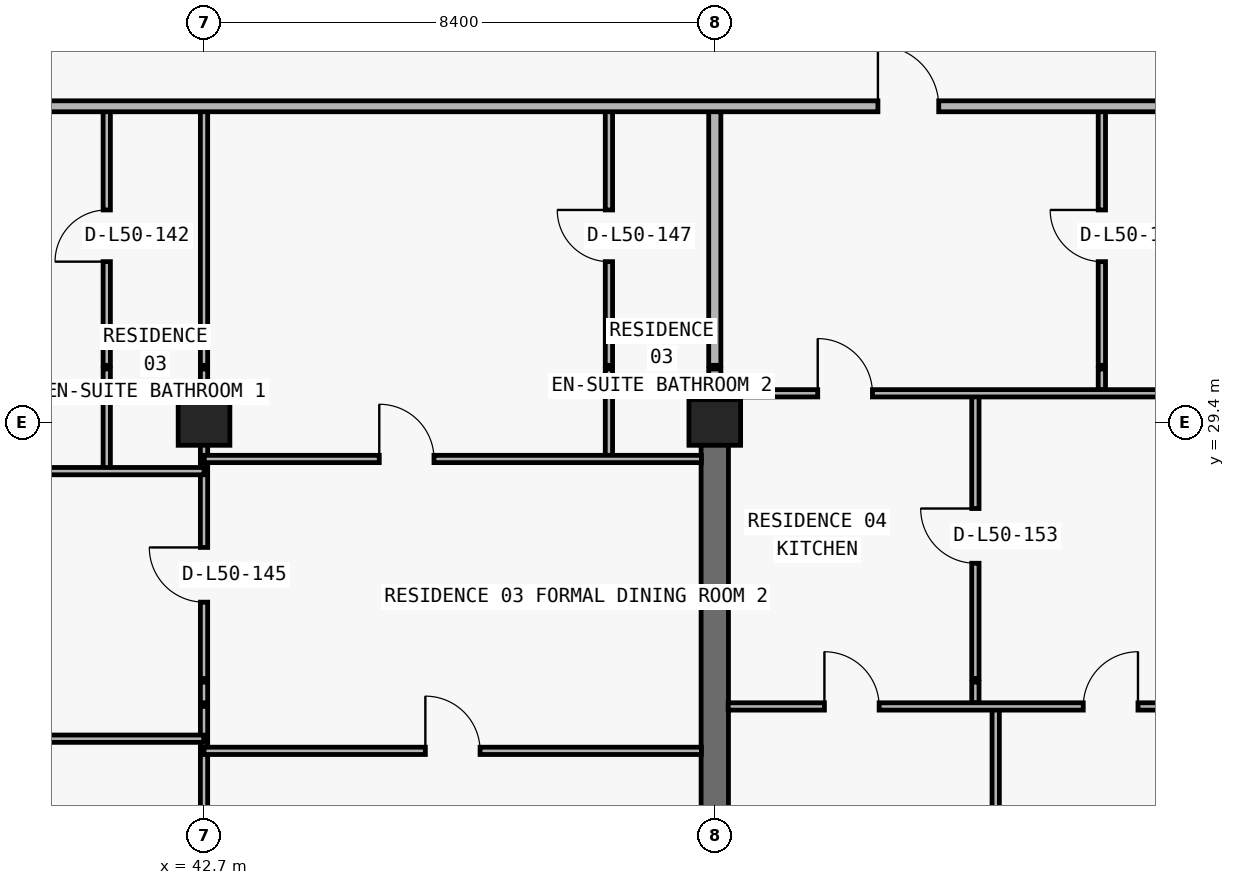
"""IFC4 building model, lengths in metres.
Left out: names, types, materials, properties, quantities, classifications, styles, units other than length and angle.
Written with IfcOpenShell. Run it as: python <this file> out.ifc"""

import sys

from ifc_helpers import new_model, si_unit, direction, frame, frame_2d, origin, origin_2d, place, context, subcontext, project, spatial, rectangle, extrude, element, fill, save


model = new_model("IFC4")
c1 = context("Model", 3, precision=1e-05, world=origin(), true_north=direction((0.0, 1.0)))
c2 = subcontext(c1, "Body", "Model", "MODEL_VIEW")
j1 = project(units=[si_unit("LENGTHUNIT", "METRE"), si_unit("PLANEANGLEUNIT", "RADIAN")], contexts=[c1])
p1 = place(None, origin())
s1 = spatial("IfcSite", under=j1, at=p1, CompositionType="ELEMENT")
p2 = place(p1, origin())
s2 = spatial("IfcBuilding", under=s1, at=p2, CompositionType="ELEMENT")
p3 = place(p2, frame((0.0, 0.0, 180.3)))
s3 = spatial("IfcBuildingStorey", under=s2, at=p3, CompositionType="ELEMENT", Elevation=180.3)
for number, where, z_axis, x_axis in (
    (1, (42.7, 29.4, 0.0), (0.0, 0.0, 1.0), (1.0, 0.0, 0.0)),
    (2, (51.1, 29.4, 0.0), (0.0, 0.0, 1.0), (1.0, 0.0, 0.0)),
):
    element("IfcColumn", number, at=place(p3, frame(where, z_axis=z_axis, x_axis=x_axis)), inside=s3, PredefinedType="COLUMN", context=c2, shape_type="SweptSolid", body=[
        extrude(rectangle(XDim=0.85, YDim=0.75, at=origin_2d()), origin(), (0.0, 0.0, 1.0), 3.0),
    ])
p4 = place(p3, frame((51.1, 20.8, 0.0), z_axis=(0.0, 0.0, 1.0), x_axis=(0.0, 1.0, 0.0)))
e3 = element("IfcWall", 3, at=p4, inside=s3, PredefinedType="SHEAR", context=c2, shape_type="SweptSolid", body=[
    extrude(rectangle(XDim=8.6, YDim=0.45, at=frame_2d((4.3, 0.0))), origin(), (0.0, 0.0, 1.0), 3.0),
])
p5 = place(p3, frame((41.1, 28.6, 0.0), z_axis=(0.0, 0.0, 1.0), x_axis=(0.0, 1.0, 0.0)))
e4 = element("IfcWall", 4, at=p5, inside=s3, PredefinedType="PARTITIONING", context=c2, shape_type="SweptSolid", body=[
    extrude(rectangle(XDim=1.28, YDim=0.12, at=frame_2d((0.64, 0.0))), origin(), (0.0, 0.0, 1.0), 3.0),
])
p6 = place(p3, frame((41.1, 29.94, 0.0), z_axis=(0.0, 0.0, 1.0), x_axis=(0.0, 1.0, 0.0)))
e5 = element("IfcWall", 5, at=p6, inside=s3, PredefinedType="PARTITIONING", context=c2, shape_type="SweptSolid", body=[
    extrude(rectangle(XDim=0.34, YDim=0.12, at=frame_2d((0.17, 0.0))), origin(), (0.0, 0.0, 1.0), 3.0),
])
p7 = place(p3, frame((41.1, 30.34, 0.0), z_axis=(0.0, 0.0, 1.0), x_axis=(0.0, 1.0, 0.0)))
e6 = element("IfcWall", 6, at=p7, inside=s3, PredefinedType="PARTITIONING", context=c2, shape_type="SweptSolid", body=[
    extrude(rectangle(XDim=4.26, YDim=0.12, at=frame_2d((2.13, 0.0))), origin(), (0.0, 0.0, 1.0), 3.0),
])
p8 = place(p7, frame((1.705, 0.0, 0.0)))
e7 = element("IfcOpeningElement", 7, at=p8, cuts=e6, PredefinedType="OPENING", context=c2, shape_type="SweptSolid", body=[
    extrude(rectangle(XDim=0.85, YDim=2.1, at=frame_2d((0.425, 1.05))), frame((0.0, 0.07, 0.0), z_axis=(0.0, -1.0, 0.0), x_axis=(1.0, 0.0, 0.0)), (0.0, 0.0, 1.0), 0.14),
])
p9 = place(p3, frame((42.7, 11.24, 0.0), z_axis=(0.0, 0.0, 1.0), x_axis=(0.0, 1.0, 0.0)))
e8 = element("IfcWall", 8, at=p9, inside=s3, PredefinedType="PARTITIONING", context=c2, shape_type="SweptSolid", body=[
    extrude(rectangle(XDim=13.49, YDim=0.12, at=frame_2d((6.745, 0.0))), origin(), (0.0, 0.0, 1.0), 2.213),
])
p10 = place(p3, frame((42.7, 24.79, 0.0), z_axis=(0.0, 0.0, 1.0), x_axis=(0.0, 1.0, 0.0)))
e9 = element("IfcWall", 9, at=p10, inside=s3, PredefinedType="PARTITIONING", context=c2, shape_type="SweptSolid", body=[
    extrude(rectangle(XDim=0.34, YDim=0.12, at=frame_2d((0.17, 0.0))), origin(), (0.0, 0.0, 1.0), 2.213),
])
p11 = place(p3, frame((42.7, 25.19, 0.0), z_axis=(0.0, 0.0, 1.0), x_axis=(0.0, 1.0, 0.0)))
e10 = element("IfcWall", 10, at=p11, inside=s3, PredefinedType="PARTITIONING", context=c2, shape_type="SweptSolid", body=[
    extrude(rectangle(XDim=4.69, YDim=0.12, at=frame_2d((2.345, 0.0))), origin(), (0.0, 0.0, 1.0), 2.213),
])
p12 = place(p11, frame((1.255, 0.0, 0.0)))
e11 = element("IfcOpeningElement", 11, at=p12, cuts=e10, PredefinedType="OPENING", context=c2, shape_type="SweptSolid", body=[
    extrude(rectangle(XDim=0.9, YDim=2.15, at=frame_2d((0.45, 1.075))), frame((0.0, 0.07, 0.0), z_axis=(0.0, -1.0, 0.0), x_axis=(1.0, 0.0, 0.0)), (0.0, 0.0, 1.0), 0.14),
])
p13 = place(p3, frame((42.7, 29.94, 0.0), z_axis=(0.0, 0.0, 1.0), x_axis=(0.0, 1.0, 0.0)))
e12 = element("IfcWall", 12, at=p13, inside=s3, PredefinedType="PARTITIONING", context=c2, shape_type="SweptSolid", body=[
    extrude(rectangle(XDim=0.34, YDim=0.12, at=frame_2d((0.17, 0.0))), origin(), (0.0, 0.0, 1.0), 2.213),
])
p14 = place(p3, frame((42.7, 30.34, 0.0), z_axis=(0.0, 0.0, 1.0), x_axis=(0.0, 1.0, 0.0)))
e13 = element("IfcWall", 13, at=p14, inside=s3, PredefinedType="PARTITIONING", context=c2, shape_type="SweptSolid", body=[
    extrude(rectangle(XDim=4.26, YDim=0.12, at=frame_2d((2.13, 0.0))), origin(), (0.0, 0.0, 1.0), 2.213),
])
p15 = place(p3, frame((49.359, 28.8, 0.0), z_axis=(0.0, 0.0, 1.0), x_axis=(0.0, 1.0, 0.0)))
e14 = element("IfcWall", 14, at=p15, inside=s3, PredefinedType="PARTITIONING", context=c2, shape_type="SweptSolid", body=[
    extrude(rectangle(XDim=1.08, YDim=0.12, at=frame_2d((0.54, 0.0))), origin(), (0.0, 0.0, 1.0), 3.0),
])
p16 = place(p3, frame((49.359, 29.94, 0.0), z_axis=(0.0, 0.0, 1.0), x_axis=(0.0, 1.0, 0.0)))
e15 = element("IfcWall", 15, at=p16, inside=s3, PredefinedType="PARTITIONING", context=c2, shape_type="SweptSolid", body=[
    extrude(rectangle(XDim=0.34, YDim=0.12, at=frame_2d((0.17, 0.0))), origin(), (0.0, 0.0, 1.0), 3.0),
])
p17 = place(p3, frame((49.359, 30.34, 0.0), z_axis=(0.0, 0.0, 1.0), x_axis=(0.0, 1.0, 0.0)))
e16 = element("IfcWall", 16, at=p17, inside=s3, PredefinedType="PARTITIONING", context=c2, shape_type="SweptSolid", body=[
    extrude(rectangle(XDim=4.26, YDim=0.12, at=frame_2d((2.13, 0.0))), origin(), (0.0, 0.0, 1.0), 3.0),
])
p18 = place(p17, frame((1.705, 0.0, 0.0)))
e17 = element("IfcOpeningElement", 17, at=p18, cuts=e16, PredefinedType="OPENING", context=c2, shape_type="SweptSolid", body=[
    extrude(rectangle(XDim=0.85, YDim=2.1, at=frame_2d((0.425, 1.05))), frame((0.0, 0.07, 0.0), z_axis=(0.0, -1.0, 0.0), x_axis=(1.0, 0.0, 0.0)), (0.0, 0.0, 1.0), 0.14),
])
p19 = place(p3, frame((51.1, 29.405, 0.0), z_axis=(0.0, 0.0, 1.0), x_axis=(0.0, 1.0, 0.0)))
e18 = element("IfcWall", 18, at=p19, inside=s3, PredefinedType="PARTITIONING", context=c2, shape_type="SweptSolid", body=[
    extrude(rectangle(XDim=0.475, YDim=0.2, at=frame_2d((0.237, 0.0))), origin(), (0.0, 0.0, 1.0), 2.285),
])
p20 = place(p3, frame((51.1, 29.94, 0.0), z_axis=(0.0, 0.0, 1.0), x_axis=(0.0, 1.0, 0.0)))
e19 = element("IfcWall", 19, at=p20, inside=s3, PredefinedType="PARTITIONING", context=c2, shape_type="SweptSolid", body=[
    extrude(rectangle(XDim=0.34, YDim=0.2, at=frame_2d((0.17, 0.0))), origin(), (0.0, 0.0, 1.0), 2.285),
])
p21 = place(p3, frame((51.1, 30.34, 0.0), z_axis=(0.0, 0.0, 1.0), x_axis=(0.0, 1.0, 0.0)))
e20 = element("IfcWall", 20, at=p21, inside=s3, PredefinedType="PARTITIONING", context=c2, shape_type="SweptSolid", body=[
    extrude(rectangle(XDim=4.26, YDim=0.2, at=frame_2d((2.13, 0.0))), origin(), (0.0, 0.0, 1.0), 2.285),
])
p22 = place(p3, frame((55.386, 24.79, 0.0), z_axis=(0.0, 0.0, 1.0), x_axis=(0.0, 1.0, 0.0)))
e21 = element("IfcWall", 21, at=p22, inside=s3, PredefinedType="PARTITIONING", context=c2, shape_type="SweptSolid", body=[
    extrude(rectangle(XDim=0.34, YDim=0.12, at=frame_2d((0.17, 0.0))), origin(), (0.0, 0.0, 1.0), 3.0),
])
p23 = place(p3, frame((55.386, 25.19, 0.0), z_axis=(0.0, 0.0, 1.0), x_axis=(0.0, 1.0, 0.0)))
e22 = element("IfcWall", 22, at=p23, inside=s3, PredefinedType="PARTITIONING", context=c2, shape_type="SweptSolid", body=[
    extrude(rectangle(XDim=4.69, YDim=0.12, at=frame_2d((2.345, 0.0))), origin(), (0.0, 0.0, 1.0), 2.675),
])
p24 = place(p23, frame((1.895, 0.0, 0.0)))
e23 = element("IfcOpeningElement", 23, at=p24, cuts=e22, PredefinedType="OPENING", context=c2, shape_type="SweptSolid", body=[
    extrude(rectangle(XDim=0.9, YDim=2.15, at=frame_2d((0.45, 1.075))), frame((0.0, 0.07, 0.0), z_axis=(0.0, -1.0, 0.0), x_axis=(1.0, 0.0, 0.0)), (0.0, 0.0, 1.0), 0.14),
])
p25 = place(p3, frame((55.72, 11.24, 0.0), z_axis=(0.0, 0.0, 1.0), x_axis=(0.0, 1.0, 0.0)))
e24 = element("IfcWall", 24, at=p25, inside=s3, PredefinedType="PARTITIONING", context=c2, shape_type="SweptSolid", body=[
    extrude(rectangle(XDim=13.49, YDim=0.12, at=frame_2d((6.745, 0.0))), origin(), (0.0, 0.0, 1.0), 3.0),
])
p26 = place(p3, frame((57.466, 29.94, 0.0), z_axis=(0.0, 0.0, 1.0), x_axis=(0.0, 1.0, 0.0)))
e25 = element("IfcWall", 25, at=p26, inside=s3, PredefinedType="PARTITIONING", context=c2, shape_type="SweptSolid", body=[
    extrude(rectangle(XDim=0.34, YDim=0.12, at=frame_2d((0.17, 0.0))), origin(), (0.0, 0.0, 1.0), 3.0),
])
p27 = place(p3, frame((57.466, 30.34, 0.0), z_axis=(0.0, 0.0, 1.0), x_axis=(0.0, 1.0, 0.0)))
e26 = element("IfcWall", 26, at=p27, inside=s3, PredefinedType="PARTITIONING", context=c2, shape_type="SweptSolid", body=[
    extrude(rectangle(XDim=4.26, YDim=0.12, at=frame_2d((2.13, 0.0))), origin(), (0.0, 0.0, 1.0), 3.0),
])
p28 = place(p27, frame((1.705, 0.0, 0.0)))
e27 = element("IfcOpeningElement", 27, at=p28, cuts=e26, PredefinedType="OPENING", context=c2, shape_type="SweptSolid", body=[
    extrude(rectangle(XDim=0.85, YDim=2.1, at=frame_2d((0.425, 1.05))), frame((0.0, 0.07, 0.0), z_axis=(0.0, -1.0, 0.0), x_axis=(1.0, 0.0, 0.0)), (0.0, 0.0, 1.0), 0.14),
])
p29 = place(p3, frame((42.7, 24.0, 0.0), z_axis=(0.0, 0.0, 1.0), x_axis=(1.0, 0.0, 0.0)))
e28 = element("IfcWall", 28, at=p29, inside=s3, PredefinedType="PARTITIONING", context=c2, shape_type="SweptSolid", body=[
    extrude(rectangle(XDim=8.18, YDim=0.12, at=frame_2d((4.09, 0.0))), origin(), (0.0, 0.0, 1.0), 3.0),
])
p30 = place(p29, frame((3.64, 0.0, 0.0)))
e29 = element("IfcOpeningElement", 29, at=p30, cuts=e28, PredefinedType="OPENING", context=c2, shape_type="SweptSolid", body=[
    extrude(rectangle(XDim=0.9, YDim=2.15, at=frame_2d((0.45, 1.075))), frame((0.0, 0.07, 0.0), z_axis=(0.0, -1.0, 0.0), x_axis=(1.0, 0.0, 0.0)), (0.0, 0.0, 1.0), 0.14),
])
p31 = place(p3, frame((35.105, 24.2, 0.0), z_axis=(0.0, 0.0, 1.0), x_axis=(1.0, 0.0, 0.0)))
e30 = element("IfcWall", 30, at=p31, inside=s3, PredefinedType="PARTITIONING", context=c2, shape_type="SweptSolid", body=[
    extrude(rectangle(XDim=7.59, YDim=0.12, at=frame_2d((3.795, 0.0))), origin(), (0.0, 0.0, 1.0), 3.0),
])
p32 = place(p31, frame((3.345, 0.0, 0.0)))
e31 = element("IfcOpeningElement", 31, at=p32, cuts=e30, PredefinedType="OPENING", context=c2, shape_type="SweptSolid", body=[
    extrude(rectangle(XDim=0.9, YDim=2.15, at=frame_2d((0.45, 1.075))), frame((0.0, 0.07, 0.0), z_axis=(0.0, -1.0, 0.0), x_axis=(1.0, 0.0, 0.0)), (0.0, 0.0, 1.0), 0.14),
])
p33 = place(p3, frame((51.32, 24.73, 0.0), z_axis=(0.0, 0.0, 1.0), x_axis=(1.0, 0.0, 0.0)))
e32 = element("IfcWall", 32, at=p33, inside=s3, PredefinedType="PARTITIONING", context=c2, shape_type="SweptSolid", body=[
    extrude(rectangle(XDim=8.18, YDim=0.12, at=frame_2d((4.09, 0.0))), origin(), (0.0, 0.0, 1.0), 3.0),
])
p34 = place(p33, frame((1.583, 0.0, 0.0)))
e33 = element("IfcOpeningElement", 33, at=p34, cuts=e32, PredefinedType="OPENING", context=c2, shape_type="SweptSolid", body=[
    extrude(rectangle(XDim=0.9, YDim=2.15, at=frame_2d((0.45, 1.075))), frame((0.0, 0.07, 0.0), z_axis=(0.0, -1.0, 0.0), x_axis=(1.0, 0.0, 0.0)), (0.0, 0.0, 1.0), 0.14),
])
p35 = place(p33, frame((5.84, 0.0, 0.0)))
e34 = element("IfcOpeningElement", 34, at=p35, cuts=e32, PredefinedType="OPENING", context=c2, shape_type="SweptSolid", body=[
    extrude(rectangle(XDim=0.9, YDim=2.15, at=frame_2d((0.45, 1.075))), frame((0.0, 0.07, 0.0), z_axis=(0.0, -1.0, 0.0), x_axis=(1.0, 0.0, 0.0)), (0.0, 0.0, 1.0), 0.14),
])
p36 = place(p3, frame((35.1, 28.6, 0.0), z_axis=(0.0, 0.0, 1.0), x_axis=(1.0, 0.0, 0.0)))
e35 = element("IfcWall", 35, at=p36, inside=s3, PredefinedType="PARTITIONING", context=c2, shape_type="SweptSolid", body=[
    extrude(rectangle(XDim=7.6, YDim=0.12, at=frame_2d((3.8, 0.0))), origin(), (0.0, 0.0, 1.0), 3.0),
])
p37 = place(p36, frame((2.55, 0.0, 0.0)))
e36 = element("IfcOpeningElement", 36, at=p37, cuts=e35, PredefinedType="OPENING", context=c2, shape_type="SweptSolid", body=[
    extrude(rectangle(XDim=0.9, YDim=2.15, at=frame_2d((0.45, 1.075))), frame((0.0, 0.07, 0.0), z_axis=(0.0, -1.0, 0.0), x_axis=(1.0, 0.0, 0.0)), (0.0, 0.0, 1.0), 0.14),
])
p38 = place(p3, frame((42.705, 28.8, 0.0), z_axis=(0.0, 0.0, 1.0), x_axis=(1.0, 0.0, 0.0)))
e37 = element("IfcWall", 37, at=p38, inside=s3, PredefinedType="PARTITIONING", context=c2, shape_type="SweptSolid", body=[
    extrude(rectangle(XDim=8.175, YDim=0.12, at=frame_2d((4.087, 0.0))), origin(), (0.0, 0.0, 1.0), 3.0),
])
p39 = place(p38, frame((2.877, 0.0, 0.0)))
e38 = element("IfcOpeningElement", 38, at=p39, cuts=e37, PredefinedType="OPENING", context=c2, shape_type="SweptSolid", body=[
    extrude(rectangle(XDim=0.9, YDim=2.15, at=frame_2d((0.45, 1.075))), frame((0.0, 0.07, 0.0), z_axis=(0.0, -1.0, 0.0), x_axis=(1.0, 0.0, 0.0)), (0.0, 0.0, 1.0), 0.14),
])
p40 = place(p3, frame((51.1, 29.88, 0.0), z_axis=(0.0, 0.0, 1.0), x_axis=(1.0, 0.0, 0.0)))
e39 = element("IfcWall", 39, at=p40, inside=s3, PredefinedType="PARTITIONING", context=c2, shape_type="SweptSolid", body=[
    extrude(rectangle(XDim=8.4, YDim=0.12, at=frame_2d((4.2, 0.0))), origin(), (0.0, 0.0, 1.0), 3.0),
])
p41 = place(p40, frame((1.693, 0.0, 0.0)))
e40 = element("IfcOpeningElement", 40, at=p41, cuts=e39, PredefinedType="OPENING", context=c2, shape_type="SweptSolid", body=[
    extrude(rectangle(XDim=0.9, YDim=2.15, at=frame_2d((0.45, 1.075))), frame((0.0, 0.07, 0.0), z_axis=(0.0, -1.0, 0.0), x_axis=(1.0, 0.0, 0.0)), (0.0, 0.0, 1.0), 0.14),
])
p42 = place(p3, frame((18.3, 34.6, 0.0), z_axis=(0.0, 0.0, 1.0), x_axis=(1.0, 0.0, 0.0)))
e41 = element("IfcWall", 41, at=p42, inside=s3, PredefinedType="PARTITIONING", context=c2, shape_type="SweptSolid", body=[
    extrude(rectangle(XDim=41.2, YDim=0.18, at=frame_2d((20.6, 0.0))), origin(), (0.0, 0.0, 1.0), 3.0),
])
p43 = place(p42, frame((2.67, 0.0, 0.0)))
e42 = element("IfcOpeningElement", 42, at=p43, cuts=e41, PredefinedType="OPENING", context=c2, shape_type="SweptSolid", body=[
    extrude(rectangle(XDim=1.0, YDim=2.2, at=frame_2d((0.5, 1.1))), frame((0.0, 0.1, 0.0), z_axis=(0.0, -1.0, 0.0), x_axis=(1.0, 0.0, 0.0)), (0.0, 0.0, 1.0), 0.2),
])
p44 = place(p42, frame((11.212, 0.0, 0.0)))
e43 = element("IfcOpeningElement", 43, at=p44, cuts=e41, PredefinedType="OPENING", context=c2, shape_type="SweptSolid", body=[
    extrude(rectangle(XDim=1.0, YDim=2.2, at=frame_2d((0.5, 1.1))), frame((0.0, 0.1, 0.0), z_axis=(0.0, -1.0, 0.0), x_axis=(1.0, 0.0, 0.0)), (0.0, 0.0, 1.0), 0.2),
])
p45 = place(p42, frame((35.483, 0.0, 0.0)))
e44 = element("IfcOpeningElement", 44, at=p45, cuts=e41, PredefinedType="OPENING", context=c2, shape_type="SweptSolid", body=[
    extrude(rectangle(XDim=1.0, YDim=2.2, at=frame_2d((0.5, 1.1))), frame((0.0, 0.1, 0.0), z_axis=(0.0, -1.0, 0.0), x_axis=(1.0, 0.0, 0.0)), (0.0, 0.0, 1.0), 0.2),
])
p46 = place(p8, origin())
e45 = element("IfcDoor", 45, at=p46, inside=s3, OperationType="SINGLE_SWING_LEFT", PredefinedType="DOOR", context=c2, shape_type="SweptSolid", body=[
    extrude(rectangle(XDim=0.85, YDim=2.1, at=frame_2d((0.425, 1.05))), frame((0.0, 0.025, 0.0), z_axis=(0.0, -1.0, 0.0), x_axis=(1.0, 0.0, 0.0)), (0.0, 0.0, 1.0), 0.05),
])
fill(e7, e45)
p47 = place(p12, origin())
e46 = element("IfcDoor", 46, at=p47, inside=s3, OperationType="SINGLE_SWING_RIGHT", PredefinedType="DOOR", context=c2, shape_type="SweptSolid", body=[
    extrude(rectangle(XDim=0.9, YDim=2.15, at=frame_2d((0.45, 1.075))), frame((0.0, 0.025, 0.0), z_axis=(0.0, -1.0, 0.0), x_axis=(1.0, 0.0, 0.0)), (0.0, 0.0, 1.0), 0.05),
])
fill(e11, e46)
p48 = place(p39, origin())
e47 = element("IfcDoor", 47, at=p48, inside=s3, OperationType="SINGLE_SWING_LEFT", PredefinedType="DOOR", context=c2, shape_type="SweptSolid", body=[
    extrude(rectangle(XDim=0.9, YDim=2.15, at=frame_2d((0.45, 1.075))), frame((0.0, 0.025, 0.0), z_axis=(0.0, -1.0, 0.0), x_axis=(1.0, 0.0, 0.0)), (0.0, 0.0, 1.0), 0.05),
])
fill(e38, e47)
p49 = place(p18, origin())
e48 = element("IfcDoor", 48, at=p49, inside=s3, OperationType="SINGLE_SWING_RIGHT", PredefinedType="DOOR", context=c2, shape_type="SweptSolid", body=[
    extrude(rectangle(XDim=0.85, YDim=2.1, at=frame_2d((0.425, 1.05))), frame((0.0, 0.025, 0.0), z_axis=(0.0, -1.0, 0.0), x_axis=(1.0, 0.0, 0.0)), (0.0, 0.0, 1.0), 0.05),
])
fill(e17, e48)
p50 = place(p30, origin())
e49 = element("IfcDoor", 49, at=p50, inside=s3, OperationType="SINGLE_SWING_LEFT", PredefinedType="DOOR", context=c2, shape_type="SweptSolid", body=[
    extrude(rectangle(XDim=0.9, YDim=2.15, at=frame_2d((0.45, 1.075))), frame((0.0, 0.025, 0.0), z_axis=(0.0, -1.0, 0.0), x_axis=(1.0, 0.0, 0.0)), (0.0, 0.0, 1.0), 0.05),
])
fill(e29, e49)
p51 = place(p45, origin())
e50 = element("IfcDoor", 50, at=p51, inside=s3, OperationType="SINGLE_SWING_LEFT", PredefinedType="DOOR", context=c2, shape_type="SweptSolid", body=[
    extrude(rectangle(XDim=1.0, YDim=2.2, at=frame_2d((0.5, 1.1))), frame((0.0, 0.025, 0.0), z_axis=(0.0, -1.0, 0.0), x_axis=(1.0, 0.0, 0.0)), (0.0, 0.0, 1.0), 0.05),
])
fill(e44, e50)
p52 = place(p28, origin())
e51 = element("IfcDoor", 51, at=p52, inside=s3, OperationType="SINGLE_SWING_RIGHT", PredefinedType="DOOR", context=c2, shape_type="SweptSolid", body=[
    extrude(rectangle(XDim=0.85, YDim=2.1, at=frame_2d((0.425, 1.05))), frame((0.0, 0.025, 0.0), z_axis=(0.0, -1.0, 0.0), x_axis=(1.0, 0.0, 0.0)), (0.0, 0.0, 1.0), 0.05),
])
fill(e27, e51)
p53 = place(p41, origin())
e52 = element("IfcDoor", 52, at=p53, inside=s3, OperationType="SINGLE_SWING_LEFT", PredefinedType="DOOR", context=c2, shape_type="SweptSolid", body=[
    extrude(rectangle(XDim=0.9, YDim=2.15, at=frame_2d((0.45, 1.075))), frame((0.0, 0.025, 0.0), z_axis=(0.0, -1.0, 0.0), x_axis=(1.0, 0.0, 0.0)), (0.0, 0.0, 1.0), 0.05),
])
fill(e40, e52)
p54 = place(p24, origin())
e53 = element("IfcDoor", 53, at=p54, inside=s3, OperationType="SINGLE_SWING_RIGHT", PredefinedType="DOOR", context=c2, shape_type="SweptSolid", body=[
    extrude(rectangle(XDim=0.9, YDim=2.15, at=frame_2d((0.45, 1.075))), frame((0.0, 0.025, 0.0), z_axis=(0.0, -1.0, 0.0), x_axis=(1.0, 0.0, 0.0)), (0.0, 0.0, 1.0), 0.05),
])
fill(e23, e53)
p55 = place(p34, origin())
e54 = element("IfcDoor", 54, at=p55, inside=s3, OperationType="SINGLE_SWING_LEFT", PredefinedType="DOOR", context=c2, shape_type="SweptSolid", body=[
    extrude(rectangle(XDim=0.9, YDim=2.15, at=frame_2d((0.45, 1.075))), frame((0.0, 0.025, 0.0), z_axis=(0.0, -1.0, 0.0), x_axis=(1.0, 0.0, 0.0)), (0.0, 0.0, 1.0), 0.05),
])
fill(e33, e54)
p56 = place(p35, origin())
e55 = element("IfcDoor", 55, at=p56, inside=s3, OperationType="SINGLE_SWING_RIGHT", PredefinedType="DOOR", context=c2, shape_type="SweptSolid", body=[
    extrude(rectangle(XDim=0.9, YDim=2.15, at=frame_2d((0.45, 1.075))), frame((0.0, 0.025, 0.0), z_axis=(0.0, -1.0, 0.0), x_axis=(1.0, 0.0, 0.0)), (0.0, 0.0, 1.0), 0.05),
])
fill(e34, e55)
save(model, sys.argv[1])
